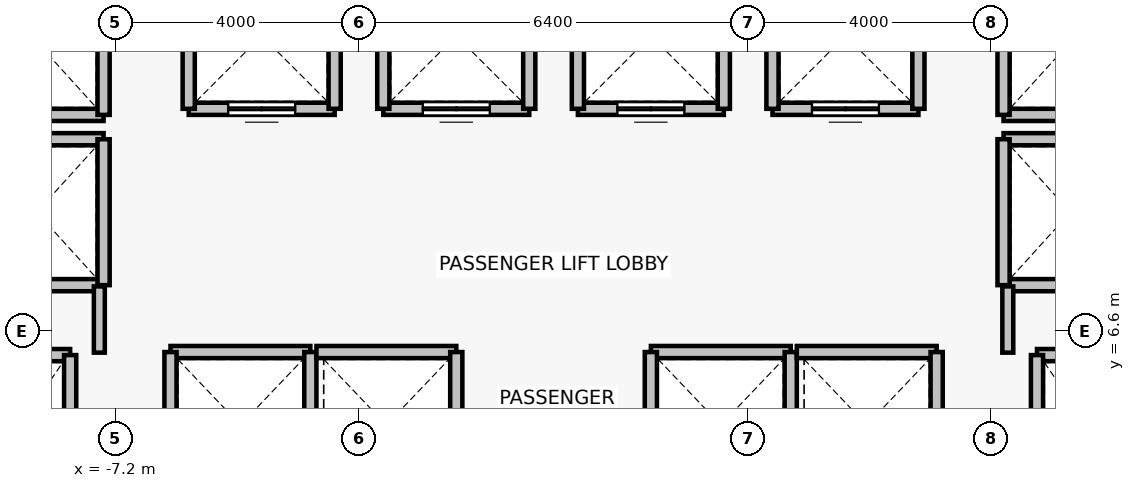
"""IFC4 building model, lengths in metres.
Left out: names, types, materials, properties, quantities, classifications, styles, units other than length and angle.
Written with IfcOpenShell. Run it as: python <this file> out.ifc"""

import sys

from ifc_helpers import new_model, si_unit, direction, frame, frame_2d, origin, place, context, subcontext, project, spatial, rectangle, extrude, source, transform, mapped, element, fill, save


model = new_model("IFC4")
c1 = context("Model", 3, precision=1e-05, world=origin(), true_north=direction((0.0, 1.0)))
c2 = subcontext(c1, "Body", "Model", "MODEL_VIEW")
j1 = project(units=[si_unit("LENGTHUNIT", "METRE"), si_unit("PLANEANGLEUNIT", "RADIAN")], contexts=[c1])
p1 = place(None, origin())
s1 = spatial("IfcSite", under=j1, at=p1, CompositionType="ELEMENT")
p2 = place(p1, origin())
s2 = spatial("IfcBuilding", under=s1, at=p2, CompositionType="ELEMENT")
p3 = place(p2, frame((0.0, 0.0, 27.4)))
s3 = spatial("IfcBuildingStorey", under=s2, at=p3, CompositionType="ELEMENT", Elevation=27.4)
p4 = place(p3, frame((-9.95, 6.2, 0.0), z_axis=(0.0, 0.0, 1.0), x_axis=(1.0, 0.0, 0.0)))
e1 = element("IfcWall", 1, at=p4, inside=s3, PredefinedType="SOLIDWALL", context=c2, shape_type="SweptSolid", body=[
    extrude(rectangle(XDim=2.0, YDim=0.2, at=frame_2d((1.0, 0.0))), origin(), (0.0, 0.0, 1.0), 3.075),
])
p5 = place(p3, frame((-7.95, 6.2, 0.0), z_axis=(0.0, 0.0, 1.0), x_axis=(0.0, -1.0, 0.0)))
e2 = element("IfcWall", 2, at=p5, inside=s3, PredefinedType="SOLIDWALL", context=c2, shape_type="SweptSolid", body=[
    extrude(rectangle(XDim=2.8, YDim=0.2, at=frame_2d((1.4, 0.0))), origin(), (0.0, 0.0, 1.0), 3.075),
])
p6 = place(p3, frame((7.95, 6.2, 0.0), z_axis=(0.0, 0.0, 1.0), x_axis=(1.0, 0.0, 0.0)))
e3 = element("IfcWall", 3, at=p6, inside=s3, PredefinedType="SOLIDWALL", context=c2, shape_type="SweptSolid", body=[
    extrude(rectangle(XDim=2.0, YDim=0.2, at=frame_2d((1.0, 0.0))), origin(), (0.0, 0.0, 1.0), 3.075),
])
p7 = place(p3, frame((7.95, 3.4, 0.0), z_axis=(0.0, 0.0, 1.0), x_axis=(0.0, 1.0, 0.0)))
e4 = element("IfcWall", 4, at=p7, inside=s3, PredefinedType="SOLIDWALL", context=c2, shape_type="SweptSolid", body=[
    extrude(rectangle(XDim=2.8, YDim=0.2, at=frame_2d((1.4, 0.0))), origin(), (0.0, 0.0, 1.0), 3.075),
])
p8 = place(p3, frame((-3.6, 10.25, 0.0), z_axis=(0.0, 0.0, 1.0), x_axis=(-1.0, 0.0, 0.0)))
e5 = element("IfcWall", 5, at=p8, inside=s3, PredefinedType="SOLIDWALL", context=c2, shape_type="SweptSolid", body=[
    extrude(rectangle(XDim=2.4, YDim=0.2, at=frame_2d((1.2, 0.0))), origin(), (0.0, 0.0, 1.0), 3.075),
])
p9 = place(p8, frame((0.65, 0.0, 0.0)))
e6 = element("IfcOpeningElement", 6, at=p9, cuts=e5, PredefinedType="OPENING", context=c2, shape_type="SweptSolid", body=[
    extrude(rectangle(XDim=1.1, YDim=2.2, at=frame_2d((0.55, 1.1))), frame((0.0, 0.11, 0.0), z_axis=(0.0, -1.0, 0.0), x_axis=(1.0, 0.0, 0.0)), (0.0, 0.0, 1.0), 0.22),
])
for number, where, z_axis, x_axis in (
    (7, (-6.0, 10.25, 0.0), (0.0, 0.0, 1.0), (0.0, 1.0, 0.0)),
    (8, (-3.6, 12.65, 0.0), (0.0, 0.0, 1.0), (0.0, -1.0, 0.0)),
):
    element("IfcWall", number, at=place(p3, frame(where, z_axis=z_axis, x_axis=x_axis)), inside=s3, PredefinedType="SOLIDWALL", context=c2, shape_type="SweptSolid", body=[
        extrude(rectangle(XDim=2.4, YDim=0.2, at=frame_2d((1.2, 0.0))), origin(), (0.0, 0.0, 1.0), 3.075),
    ])
p10 = place(p3, frame((-0.4, 10.25, 0.0), z_axis=(0.0, 0.0, 1.0), x_axis=(-1.0, 0.0, 0.0)))
e9 = element("IfcWall", 9, at=p10, inside=s3, PredefinedType="SOLIDWALL", context=c2, shape_type="SweptSolid", body=[
    extrude(rectangle(XDim=2.4, YDim=0.2, at=frame_2d((1.2, 0.0))), origin(), (0.0, 0.0, 1.0), 3.075),
])
p11 = place(p10, frame((0.65, 0.0, 0.0)))
e10 = element("IfcOpeningElement", 10, at=p11, cuts=e9, PredefinedType="OPENING", context=c2, shape_type="SweptSolid", body=[
    extrude(rectangle(XDim=1.1, YDim=2.2, at=frame_2d((0.55, 1.1))), frame((0.0, 0.11, 0.0), z_axis=(0.0, -1.0, 0.0), x_axis=(1.0, 0.0, 0.0)), (0.0, 0.0, 1.0), 0.22),
])
for number, where, z_axis, x_axis in (
    (11, (-2.8, 10.25, 0.0), (0.0, 0.0, 1.0), (0.0, 1.0, 0.0)),
    (12, (-0.4, 12.65, 0.0), (0.0, 0.0, 1.0), (0.0, -1.0, 0.0)),
):
    element("IfcWall", number, at=place(p3, frame(where, z_axis=z_axis, x_axis=x_axis)), inside=s3, PredefinedType="SOLIDWALL", context=c2, shape_type="SweptSolid", body=[
        extrude(rectangle(XDim=2.4, YDim=0.2, at=frame_2d((1.2, 0.0))), origin(), (0.0, 0.0, 1.0), 3.075),
    ])
p12 = place(p3, frame((2.8, 10.25, 0.0), z_axis=(0.0, 0.0, 1.0), x_axis=(-1.0, 0.0, 0.0)))
e13 = element("IfcWall", 13, at=p12, inside=s3, PredefinedType="SOLIDWALL", context=c2, shape_type="SweptSolid", body=[
    extrude(rectangle(XDim=2.4, YDim=0.2, at=frame_2d((1.2, 0.0))), origin(), (0.0, 0.0, 1.0), 3.075),
])
p13 = place(p12, frame((0.65, 0.0, 0.0)))
e14 = element("IfcOpeningElement", 14, at=p13, cuts=e13, PredefinedType="OPENING", context=c2, shape_type="SweptSolid", body=[
    extrude(rectangle(XDim=1.1, YDim=2.2, at=frame_2d((0.55, 1.1))), frame((0.0, 0.11, 0.0), z_axis=(0.0, -1.0, 0.0), x_axis=(1.0, 0.0, 0.0)), (0.0, 0.0, 1.0), 0.22),
])
for number, where, z_axis, x_axis in (
    (15, (0.4, 10.25, 0.0), (0.0, 0.0, 1.0), (0.0, 1.0, 0.0)),
    (16, (2.8, 12.65, 0.0), (0.0, 0.0, 1.0), (0.0, -1.0, 0.0)),
):
    element("IfcWall", number, at=place(p3, frame(where, z_axis=z_axis, x_axis=x_axis)), inside=s3, PredefinedType="SOLIDWALL", context=c2, shape_type="SweptSolid", body=[
        extrude(rectangle(XDim=2.4, YDim=0.2, at=frame_2d((1.2, 0.0))), origin(), (0.0, 0.0, 1.0), 3.075),
    ])
p14 = place(p3, frame((6.0, 10.25, 0.0), z_axis=(0.0, 0.0, 1.0), x_axis=(-1.0, 0.0, 0.0)))
e17 = element("IfcWall", 17, at=p14, inside=s3, PredefinedType="SOLIDWALL", context=c2, shape_type="SweptSolid", body=[
    extrude(rectangle(XDim=2.4, YDim=0.2, at=frame_2d((1.2, 0.0))), origin(), (0.0, 0.0, 1.0), 3.075),
])
p15 = place(p14, frame((0.65, 0.0, 0.0)))
e18 = element("IfcOpeningElement", 18, at=p15, cuts=e17, PredefinedType="OPENING", context=c2, shape_type="SweptSolid", body=[
    extrude(rectangle(XDim=1.1, YDim=2.2, at=frame_2d((0.55, 1.1))), frame((0.0, 0.11, 0.0), z_axis=(0.0, -1.0, 0.0), x_axis=(1.0, 0.0, 0.0)), (0.0, 0.0, 1.0), 0.22),
])
for number, where, z_axis, x_axis in (
    (19, (3.6, 10.25, 0.0), (0.0, 0.0, 1.0), (0.0, 1.0, 0.0)),
    (20, (6.0, 12.65, 0.0), (0.0, 0.0, 1.0), (0.0, -1.0, 0.0)),
):
    element("IfcWall", number, at=place(p3, frame(where, z_axis=z_axis, x_axis=x_axis)), inside=s3, PredefinedType="SOLIDWALL", context=c2, shape_type="SweptSolid", body=[
        extrude(rectangle(XDim=2.4, YDim=0.2, at=frame_2d((1.2, 0.0))), origin(), (0.0, 0.0, 1.0), 3.075),
    ])
p16 = place(p3, frame((-6.3, 6.25, 0.0), z_axis=(0.0, 0.0, 1.0), x_axis=(1.0, 0.0, 0.0)))
e21 = element("IfcWall", 21, at=p16, inside=s3, PredefinedType="SOLIDWALL", context=c2, shape_type="SweptSolid", body=[
    extrude(rectangle(XDim=2.3, YDim=0.2, at=frame_2d((1.15, 0.0))), origin(), (0.0, 0.0, 1.0), 3.075),
])
for number, where, z_axis, x_axis in (
    (22, (-6.3, 3.85, 0.0), (0.0, 0.0, 1.0), (0.0, 1.0, 0.0)),
    (23, (-4.0, 6.25, 0.0), (0.0, 0.0, 1.0), (0.0, -1.0, 0.0)),
):
    element("IfcWall", number, at=place(p3, frame(where, z_axis=z_axis, x_axis=x_axis)), inside=s3, PredefinedType="SOLIDWALL", context=c2, shape_type="SweptSolid", body=[
        extrude(rectangle(XDim=2.4, YDim=0.2, at=frame_2d((1.2, 0.0))), origin(), (0.0, 0.0, 1.0), 3.075),
    ])
p17 = place(p3, frame((-3.9, 6.25, 0.0), z_axis=(0.0, 0.0, 1.0), x_axis=(1.0, 0.0, 0.0)))
e24 = element("IfcWall", 24, at=p17, inside=s3, PredefinedType="SOLIDWALL", context=c2, shape_type="SweptSolid", body=[
    extrude(rectangle(XDim=2.3, YDim=0.2, at=frame_2d((1.15, 0.0))), origin(), (0.0, 0.0, 1.0), 3.075),
])
p18 = place(p3, frame((-1.6, 6.25, 0.0), z_axis=(0.0, 0.0, 1.0), x_axis=(0.0, -1.0, 0.0)))
e25 = element("IfcWall", 25, at=p18, inside=s3, PredefinedType="SOLIDWALL", context=c2, shape_type="SweptSolid", body=[
    extrude(rectangle(XDim=2.4, YDim=0.2, at=frame_2d((1.2, 0.0))), origin(), (0.0, 0.0, 1.0), 3.075),
])
p19 = place(p3, frame((1.6, 6.25, 0.0), z_axis=(0.0, 0.0, 1.0), x_axis=(1.0, 0.0, 0.0)))
e26 = element("IfcWall", 26, at=p19, inside=s3, PredefinedType="SOLIDWALL", context=c2, shape_type="SweptSolid", body=[
    extrude(rectangle(XDim=2.3, YDim=0.2, at=frame_2d((1.15, 0.0))), origin(), (0.0, 0.0, 1.0), 3.075),
])
for number, where, z_axis, x_axis in (
    (27, (1.6, 3.85, 0.0), (0.0, 0.0, 1.0), (0.0, 1.0, 0.0)),
    (28, (3.9, 6.25, 0.0), (0.0, 0.0, 1.0), (0.0, -1.0, 0.0)),
):
    element("IfcWall", number, at=place(p3, frame(where, z_axis=z_axis, x_axis=x_axis)), inside=s3, PredefinedType="SOLIDWALL", context=c2, shape_type="SweptSolid", body=[
        extrude(rectangle(XDim=2.4, YDim=0.2, at=frame_2d((1.2, 0.0))), origin(), (0.0, 0.0, 1.0), 3.075),
    ])
p20 = place(p3, frame((4.0, 6.25, 0.0), z_axis=(0.0, 0.0, 1.0), x_axis=(1.0, 0.0, 0.0)))
e29 = element("IfcWall", 29, at=p20, inside=s3, PredefinedType="SOLIDWALL", context=c2, shape_type="SweptSolid", body=[
    extrude(rectangle(XDim=2.3, YDim=0.2, at=frame_2d((1.15, 0.0))), origin(), (0.0, 0.0, 1.0), 3.075),
])
p21 = place(p3, frame((6.3, 6.25, 0.0), z_axis=(0.0, 0.0, 1.0), x_axis=(0.0, -1.0, 0.0)))
e30 = element("IfcWall", 30, at=p21, inside=s3, PredefinedType="SOLIDWALL", context=c2, shape_type="SweptSolid", body=[
    extrude(rectangle(XDim=2.4, YDim=0.2, at=frame_2d((1.2, 0.0))), origin(), (0.0, 0.0, 1.0), 3.075),
])
for number, where, z_axis, x_axis in (
    (31, (-7.4, 7.35, 0.0), (0.0, 0.0, 1.0), (-1.0, 0.0, 0.0)),
    (32, (-9.6, 9.75, 0.0), (0.0, 0.0, 1.0), (1.0, 0.0, 0.0)),
):
    element("IfcWall", number, at=place(p3, frame(where, z_axis=z_axis, x_axis=x_axis)), inside=s3, PredefinedType="SOLIDWALL", context=c2, shape_type="SweptSolid", body=[
        extrude(rectangle(XDim=2.2, YDim=0.2, at=frame_2d((1.1, 0.0))), origin(), (0.0, 0.0, 1.0), 2.465),
    ])
p22 = place(p3, frame((-7.4, 9.75, 0.0), z_axis=(0.0, 0.0, 1.0), x_axis=(0.0, -1.0, 0.0)))
e33 = element("IfcWall", 33, at=p22, inside=s3, PredefinedType="SOLIDWALL", context=c2, shape_type="SweptSolid", body=[
    extrude(rectangle(XDim=2.4, YDim=0.2, at=frame_2d((1.2, 0.0))), origin(), (0.0, 0.0, 1.0), 2.465),
])
p23 = place(p3, frame((-7.4, 10.15, 0.0), z_axis=(0.0, 0.0, 1.0), x_axis=(-1.0, 0.0, 0.0)))
e34 = element("IfcWall", 34, at=p23, inside=s3, PredefinedType="SOLIDWALL", context=c2, shape_type="SweptSolid", body=[
    extrude(rectangle(XDim=2.2, YDim=0.2, at=frame_2d((1.1, 0.0))), origin(), (0.0, 0.0, 1.0), 2.465),
])
p24 = place(p3, frame((-7.4, 12.55, 0.0), z_axis=(0.0, 0.0, 1.0), x_axis=(0.0, -1.0, 0.0)))
e35 = element("IfcWall", 35, at=p24, inside=s3, PredefinedType="SOLIDWALL", context=c2, shape_type="SweptSolid", body=[
    extrude(rectangle(XDim=2.4, YDim=0.2, at=frame_2d((1.2, 0.0))), origin(), (0.0, 0.0, 1.0), 2.465),
])
for number, where, z_axis, x_axis in (
    (36, (9.6, 7.35, 0.0), (0.0, 0.0, 1.0), (-1.0, 0.0, 0.0)),
    (37, (7.4, 9.75, 0.0), (0.0, 0.0, 1.0), (1.0, 0.0, 0.0)),
):
    element("IfcWall", number, at=place(p3, frame(where, z_axis=z_axis, x_axis=x_axis)), inside=s3, PredefinedType="SOLIDWALL", context=c2, shape_type="SweptSolid", body=[
        extrude(rectangle(XDim=2.2, YDim=0.2, at=frame_2d((1.1, 0.0))), origin(), (0.0, 0.0, 1.0), 2.465),
    ])
p25 = place(p3, frame((7.4, 7.35, 0.0), z_axis=(0.0, 0.0, 1.0), x_axis=(0.0, 1.0, 0.0)))
e38 = element("IfcWall", 38, at=p25, inside=s3, PredefinedType="SOLIDWALL", context=c2, shape_type="SweptSolid", body=[
    extrude(rectangle(XDim=2.4, YDim=0.2, at=frame_2d((1.2, 0.0))), origin(), (0.0, 0.0, 1.0), 2.465),
])
p26 = place(p3, frame((9.6, 10.15, 0.0), z_axis=(0.0, 0.0, 1.0), x_axis=(-1.0, 0.0, 0.0)))
e39 = element("IfcWall", 39, at=p26, inside=s3, PredefinedType="SOLIDWALL", context=c2, shape_type="SweptSolid", body=[
    extrude(rectangle(XDim=2.2, YDim=0.2, at=frame_2d((1.1, 0.0))), origin(), (0.0, 0.0, 1.0), 2.465),
])
p27 = place(p3, frame((7.4, 10.15, 0.0), z_axis=(0.0, 0.0, 1.0), x_axis=(0.0, 1.0, 0.0)))
e40 = element("IfcWall", 40, at=p27, inside=s3, PredefinedType="SOLIDWALL", context=c2, shape_type="SweptSolid", body=[
    extrude(rectangle(XDim=2.4, YDim=0.2, at=frame_2d((1.2, 0.0))), origin(), (0.0, 0.0, 1.0), 2.465),
])
for number, where, z_axis, x_axis in (
    (41, (-7.47, 7.33, 0.0), (0.0, 0.0, 1.0), (0.0, -1.0, 0.0)),
    (42, (7.47, 6.24, 0.0), (0.0, 0.0, 1.0), (0.0, 1.0, 0.0)),
):
    element("IfcWall", number, at=place(p3, frame(where, z_axis=z_axis, x_axis=x_axis)), inside=s3, PredefinedType="PARTITIONING", context=c2, shape_type="SweptSolid", body=[
        extrude(rectangle(XDim=1.09, YDim=0.18, at=frame_2d((0.545, 0.0))), origin(), (0.0, 0.0, 1.0), 2.465),
    ])
m1 = source(origin(), c2, "Body", "SweptSolid", [
    extrude(rectangle(XDim=1.1, YDim=2.2, at=frame_2d((0.55, 1.1))), frame((0.0, 0.025, 0.0), z_axis=(0.0, -1.0, 0.0), x_axis=(1.0, 0.0, 0.0)), (0.0, 0.0, 1.0), 0.05),
])
p28 = place(p9, origin())
e43 = element("IfcDoor", 43, at=p28, inside=s3, OperationType="DOUBLE_DOOR_SLIDING", PredefinedType="DOOR", context=c2, shape_type="MappedRepresentation", body=[
    mapped(m1, transform((0.0, 0.0, 0.0), x_axis=(1.0, 0.0, 0.0), y_axis=(0.0, 1.0, 0.0), z_axis=(0.0, 0.0, 1.0), scale=1.0)),
])
fill(e6, e43)
p29 = place(p11, origin())
e44 = element("IfcDoor", 44, at=p29, inside=s3, OperationType="DOUBLE_DOOR_SLIDING", PredefinedType="DOOR", context=c2, shape_type="MappedRepresentation", body=[
    mapped(m1, transform((0.0, 0.0, 0.0), x_axis=(1.0, 0.0, 0.0), y_axis=(0.0, 1.0, 0.0), z_axis=(0.0, 0.0, 1.0), scale=1.0)),
])
fill(e10, e44)
p30 = place(p13, origin())
e45 = element("IfcDoor", 45, at=p30, inside=s3, OperationType="DOUBLE_DOOR_SLIDING", PredefinedType="DOOR", context=c2, shape_type="MappedRepresentation", body=[
    mapped(m1, transform((0.0, 0.0, 0.0), x_axis=(1.0, 0.0, 0.0), y_axis=(0.0, 1.0, 0.0), z_axis=(0.0, 0.0, 1.0), scale=1.0)),
])
fill(e14, e45)
p31 = place(p15, origin())
e46 = element("IfcDoor", 46, at=p31, inside=s3, OperationType="DOUBLE_DOOR_SLIDING", PredefinedType="DOOR", context=c2, shape_type="MappedRepresentation", body=[
    mapped(m1, transform((0.0, 0.0, 0.0), x_axis=(1.0, 0.0, 0.0), y_axis=(0.0, 1.0, 0.0), z_axis=(0.0, 0.0, 1.0), scale=1.0)),
])
fill(e18, e46)
save(model, sys.argv[1])
